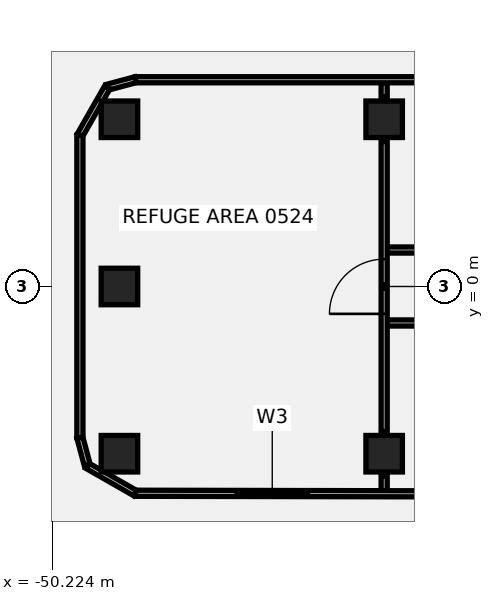
"""IFC4 building model, lengths in metres.
Left out: names, types, materials, properties, quantities, classifications, styles, units other than length and angle.
Written with IfcOpenShell. Run it as: python <this file> out.ifc"""

import sys

from ifc_helpers import new_model, si_unit, direction, frame, frame_2d, origin, origin_2d, place, context, subcontext, project, spatial, rectangle, extrude, element, fill, save


model = new_model("IFC4")
c1 = context("Model", 3, precision=1e-05, world=origin(), true_north=direction((0.0, 1.0)))
c2 = subcontext(c1, "Body", "Model", "MODEL_VIEW")
j1 = project(units=[si_unit("LENGTHUNIT", "METRE"), si_unit("PLANEANGLEUNIT", "RADIAN")], contexts=[c1])
p1 = place(None, origin())
s1 = spatial("IfcSite", under=j1, at=p1, CompositionType="ELEMENT")
p2 = place(p1, origin())
s2 = spatial("IfcBuilding", under=s1, at=p2, CompositionType="ELEMENT")
p3 = place(p2, frame((0.0, 0.0, 29.5)))
s3 = spatial("IfcBuildingStorey", under=s2, at=p3, CompositionType="ELEMENT", Elevation=29.5)
p4 = place(p3, frame((-39.3, -5.5, -0.6), z_axis=(0.0, 0.0, 1.0), x_axis=(1.0, 0.0, 0.0)))
e1 = element("IfcColumn", 1, at=p4, inside=s3, PredefinedType="COLUMN", context=c2, shape_type="SweptSolid", body=[
    extrude(rectangle(XDim=1.2, YDim=1.2, at=origin_2d()), origin(), (0.0, 0.0, 1.0), 4.926),
])
p5 = place(p3, frame((-39.3, 5.5, -0.6), z_axis=(0.0, 0.0, 1.0), x_axis=(1.0, 0.0, 0.0)))
e2 = element("IfcColumn", 2, at=p5, inside=s3, PredefinedType="COLUMN", context=c2, shape_type="SweptSolid", body=[
    extrude(rectangle(XDim=1.2, YDim=1.2, at=origin_2d()), origin(), (0.0, 0.0, 1.0), 4.926),
])
p6 = place(p3, frame((-48.008, 5.5, -0.6), z_axis=(0.0, 0.0, 1.0), x_axis=(1.0, 0.0, 0.0)))
e3 = element("IfcColumn", 3, at=p6, inside=s3, PredefinedType="COLUMN", context=c2, shape_type="SweptSolid", body=[
    extrude(rectangle(XDim=1.2, YDim=1.2, at=origin_2d()), origin(), (0.0, 0.0, 1.0), 4.918),
])
p7 = place(p3, frame((-48.008, 0.0, -0.6), z_axis=(0.0, 0.0, 1.0), x_axis=(1.0, 0.0, 0.0)))
e4 = element("IfcColumn", 4, at=p7, inside=s3, PredefinedType="COLUMN", context=c2, shape_type="SweptSolid", body=[
    extrude(rectangle(XDim=1.2, YDim=1.2, at=origin_2d()), origin(), (0.0, 0.0, 1.0), 4.917),
])
p8 = place(p3, frame((-48.008, -5.5, -0.6), z_axis=(0.0, 0.0, 1.0), x_axis=(1.0, 0.0, 0.0)))
e5 = element("IfcColumn", 5, at=p8, inside=s3, PredefinedType="COLUMN", context=c2, shape_type="SweptSolid", body=[
    extrude(rectangle(XDim=1.2, YDim=1.2, at=origin_2d()), origin(), (0.0, 0.0, 1.0), 4.909),
])
p9 = place(p3, frame((-39.22, -1.2, 0.0), z_axis=(0.0, 0.0, 1.0), x_axis=(1.0, 0.0, 0.0)))
e6 = element("IfcWall", 6, at=p9, inside=s3, PredefinedType="PARTITIONING", context=c2, shape_type="SweptSolid", body=[
    extrude(rectangle(XDim=13.335, YDim=0.2, at=frame_2d((6.667, 0.0))), origin(), (0.0, 0.0, 1.0), 3.76),
])
p10 = place(p9, frame((7.42, 0.0, 0.0)))
e7 = element("IfcOpeningElement", 7, at=p10, cuts=e6, PredefinedType="OPENING", context=c2, shape_type="SweptSolid", body=[
    extrude(rectangle(XDim=1.8, YDim=2.1, at=frame_2d((0.9, 1.05))), frame((0.0, 0.11, 0.0), z_axis=(0.0, -1.0, 0.0), x_axis=(1.0, 0.0, 0.0)), (0.0, 0.0, 1.0), 0.22),
])
p11 = place(p3, frame((-39.22, 1.2, 0.0), z_axis=(0.0, 0.0, 1.0), x_axis=(1.0, 0.0, 0.0)))
e8 = element("IfcWall", 8, at=p11, inside=s3, PredefinedType="PARTITIONING", context=c2, shape_type="SweptSolid", body=[
    extrude(rectangle(XDim=2.68, YDim=0.2, at=frame_2d((1.34, 0.0))), origin(), (0.0, 0.0, 1.0), 3.76),
])
p12 = place(p3, frame((-39.3, -6.715, 0.0), z_axis=(0.0, 0.0, 1.0), x_axis=(0.0, 1.0, 0.0)))
e9 = element("IfcWall", 9, at=p12, inside=s3, PredefinedType="PARTITIONING", context=c2, shape_type="SweptSolid", body=[
    extrude(rectangle(XDim=0.485, YDim=0.2, at=frame_2d((0.243, 0.0))), origin(), (0.0, 0.0, 1.0), 3.76),
])
p13 = place(p3, frame((-39.3, -4.77, 0.0), z_axis=(0.0, 0.0, 1.0), x_axis=(0.0, 1.0, 0.0)))
e10 = element("IfcWall", 10, at=p13, inside=s3, PredefinedType="PARTITIONING", context=c2, shape_type="SweptSolid", body=[
    extrude(rectangle(XDim=9.54, YDim=0.2, at=frame_2d((4.77, 0.0))), origin(), (0.0, 0.0, 1.0), 3.76),
])
p14 = place(p13, frame((3.87, 0.0, 0.0)))
e11 = element("IfcOpeningElement", 11, at=p14, cuts=e10, PredefinedType="OPENING", context=c2, shape_type="SweptSolid", body=[
    extrude(rectangle(XDim=1.8, YDim=2.1, at=frame_2d((0.9, 1.05))), frame((0.0, 0.11, 0.0), z_axis=(0.0, -1.0, 0.0), x_axis=(1.0, 0.0, 0.0)), (0.0, 0.0, 1.0), 0.22),
])
p15 = place(p3, frame((-39.3, 6.23, 0.0), z_axis=(0.0, 0.0, 1.0), x_axis=(0.0, 1.0, 0.0)))
e12 = element("IfcWall", 12, at=p15, inside=s3, PredefinedType="PARTITIONING", context=c2, shape_type="SweptSolid", body=[
    extrude(rectangle(XDim=0.469, YDim=0.2, at=frame_2d((0.234, 0.0))), origin(), (0.0, 0.0, 1.0), 3.76),
])
p16 = place(p3, frame((-25.181, 6.8, 0.0), z_axis=(0.0, 0.0, 1.0), x_axis=(-1.0, 0.0, 0.0)))
e13 = element("IfcWall", 13, at=p16, inside=s3, PredefinedType="SOLIDWALL", context=c2, shape_type="SweptSolid", body=[
    extrude(rectangle(XDim=22.3, YDim=0.2, at=frame_2d((11.15, 0.0))), origin(), (0.0, 0.0, 1.0), 4.36),
])
p17 = place(p16, frame((0.9, 0.0, 1.4)))
e14 = element("IfcOpeningElement", 14, at=p17, cuts=e13, PredefinedType="OPENING", context=c2, shape_type="SweptSolid", body=[
    extrude(rectangle(XDim=2.4, YDim=2.1, at=frame_2d((1.2, 1.05))), frame((0.0, 0.11, 0.0), z_axis=(0.0, -1.0, 0.0), x_axis=(1.0, 0.0, 0.0)), (0.0, 0.0, 1.0), 0.22),
])
p18 = place(p3, frame((-47.481, 6.8, 0.0), z_axis=(0.0, 0.0, 1.0), x_axis=(-0.96591611198, -0.258855296676, 0.0)))
e15 = element("IfcWall", 15, at=p18, inside=s3, PredefinedType="SOLIDWALL", context=c2, shape_type="SweptSolid", body=[
    extrude(rectangle(XDim=0.955, YDim=0.2, at=frame_2d((0.478, 0.0))), origin(), (0.0, 0.0, 1.0), 4.36),
])
p19 = place(p3, frame((-48.404, 6.553, 0.0), z_axis=(0.0, 0.0, 1.0), x_axis=(-0.496644654848, -0.867953965836, 0.0)))
e16 = element("IfcWall", 16, at=p19, inside=s3, PredefinedType="SOLIDWALL", context=c2, shape_type="SweptSolid", body=[
    extrude(rectangle(XDim=1.819, YDim=0.2, at=frame_2d((0.91, 0.0))), origin(), (0.0, 0.0, 1.0), 4.36),
])
p20 = place(p3, frame((-49.308, 4.974, 0.0), z_axis=(0.0, 0.0, 1.0), x_axis=(0.0, -1.0, 0.0)))
e17 = element("IfcWall", 17, at=p20, inside=s3, PredefinedType="SOLIDWALL", context=c2, shape_type="SweptSolid", body=[
    extrude(rectangle(XDim=9.947, YDim=0.2, at=frame_2d((4.974, 0.0))), origin(), (0.0, 0.0, 1.0), 4.36),
])
p21 = place(p3, frame((-49.308, -4.974, 0.0), z_axis=(0.0, 0.0, 1.0), x_axis=(0.258855296676, -0.96591611198, 0.0)))
e18 = element("IfcWall", 18, at=p21, inside=s3, PredefinedType="SOLIDWALL", context=c2, shape_type="SweptSolid", body=[
    extrude(rectangle(XDim=0.955, YDim=0.2, at=frame_2d((0.478, 0.0))), origin(), (0.0, 0.0, 1.0), 4.36),
])
p22 = place(p3, frame((-49.06, -5.896, 0.0), z_axis=(0.0, 0.0, 1.0), x_axis=(0.867987059309, -0.496586815041, 0.0)))
e19 = element("IfcWall", 19, at=p22, inside=s3, PredefinedType="SOLIDWALL", context=c2, shape_type="SweptSolid", body=[
    extrude(rectangle(XDim=1.82, YDim=0.2, at=frame_2d((0.91, 0.0))), origin(), (0.0, 0.0, 1.0), 4.36),
])
p23 = place(p3, frame((-47.481, -6.8, 0.0), z_axis=(0.0, 0.0, 1.0), x_axis=(0.999998066603, -0.001966415802, 0.0)))
e20 = element("IfcWall", 20, at=p23, inside=s3, PredefinedType="SOLIDWALL", context=c2, shape_type="SweptSolid", body=[
    extrude(rectangle(XDim=22.596, YDim=0.2, at=frame_2d((11.298, 0.0))), origin(), (0.0, 0.0, 1.0), 4.36),
])
p24 = place(p23, frame((3.3, 0.0, 1.4)))
e21 = element("IfcOpeningElement", 21, at=p24, cuts=e20, PredefinedType="OPENING", context=c2, shape_type="SweptSolid", body=[
    extrude(rectangle(XDim=2.4, YDim=2.1, at=frame_2d((1.2, 1.05))), frame((0.0, 0.11, 0.0), z_axis=(0.0, -1.0, 0.0), x_axis=(1.0, 0.0, 0.0)), (0.0, 0.0, 1.0), 0.22),
])
p25 = place(p23, frame((13.75, 0.0, 1.4)))
e22 = element("IfcOpeningElement", 22, at=p25, cuts=e20, PredefinedType="OPENING", context=c2, shape_type="SweptSolid", body=[
    extrude(rectangle(XDim=2.4, YDim=2.1, at=frame_2d((1.2, 1.05))), frame((0.0, 0.11, 0.0), z_axis=(0.0, -1.0, 0.0), x_axis=(1.0, 0.0, 0.0)), (0.0, 0.0, 1.0), 0.22),
])
p26 = place(p14, origin())
e23 = element("IfcDoor", 23, at=p26, inside=s3, OperationType="DOUBLE_DOOR_SINGLE_SWING", PredefinedType="DOOR", context=c2, shape_type="SweptSolid", body=[
    extrude(rectangle(XDim=1.8, YDim=2.1, at=frame_2d((0.9, 1.05))), frame((0.0, 0.025, 0.0), z_axis=(0.0, -1.0, 0.0), x_axis=(1.0, 0.0, 0.0)), (0.0, 0.0, 1.0), 0.05),
])
fill(e11, e23)
p27 = place(p24, origin())
e24 = element("IfcWindow", 24, at=p27, inside=s3, PartitioningType="SINGLE_PANEL", PredefinedType="WINDOW", context=c2, shape_type="SweptSolid", body=[
    extrude(rectangle(XDim=2.4, YDim=2.1, at=frame_2d((1.2, 1.05))), frame((0.0, 0.03, 0.0), z_axis=(0.0, -1.0, 0.0), x_axis=(1.0, 0.0, 0.0)), (0.0, 0.0, 1.0), 0.06),
])
fill(e21, e24)
save(model, sys.argv[1])
